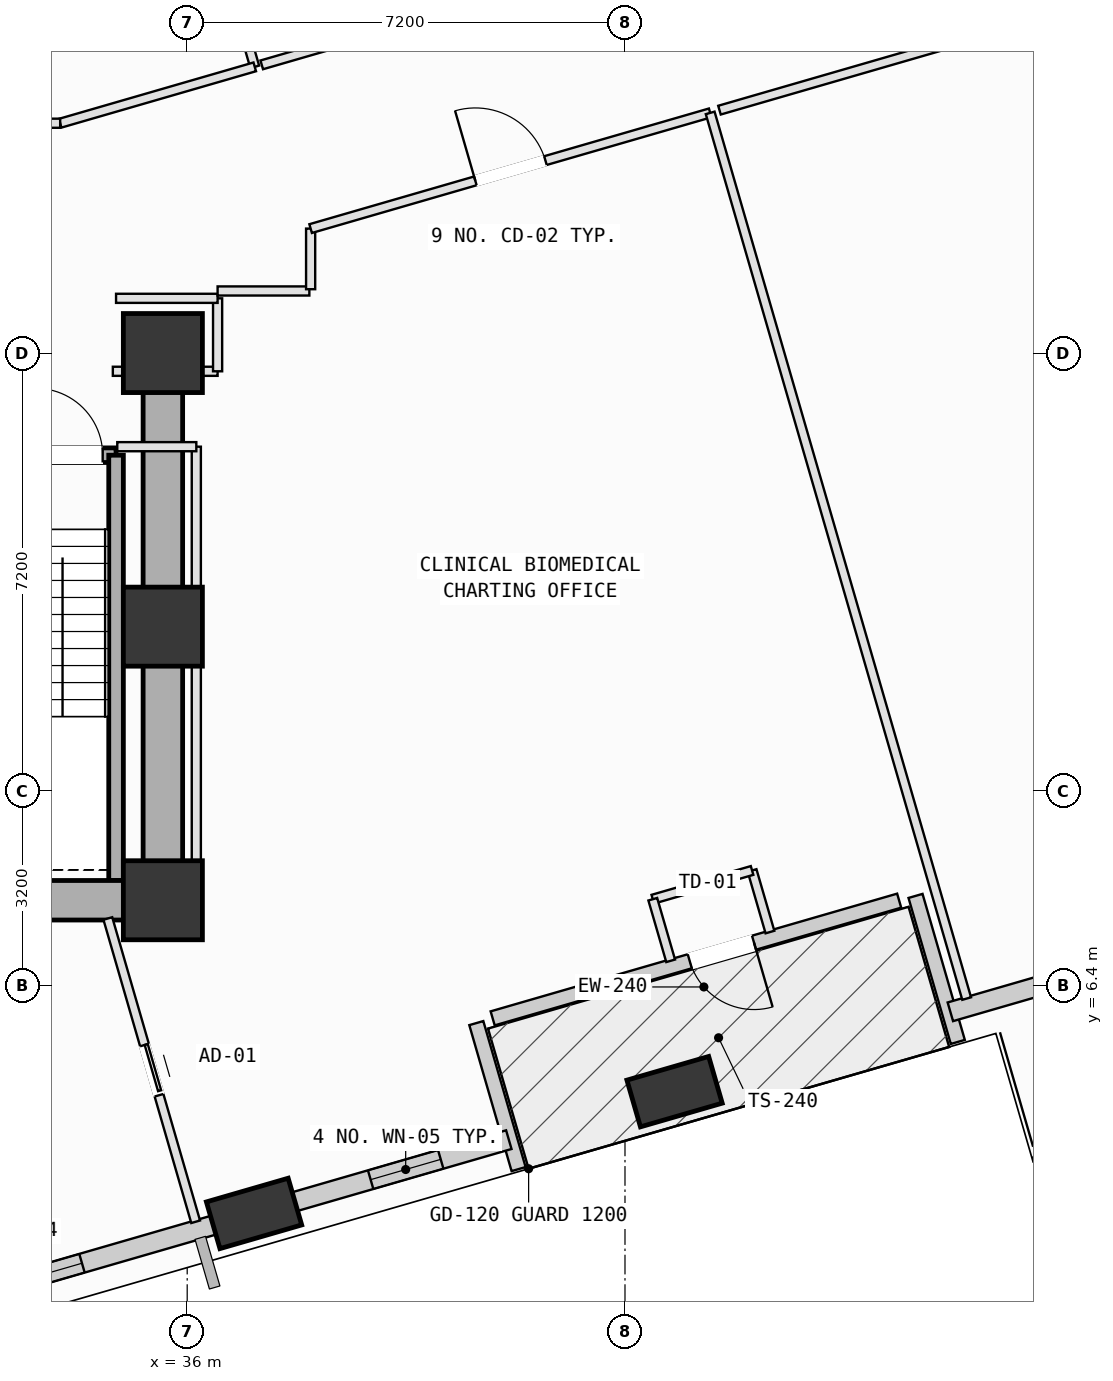
"""IFC4 building model, lengths in metres.
Left out: names, types, materials, properties, quantities, classifications, styles, units other than length and angle.
Written with IfcOpenShell. Run it as: python <this file> out.ifc"""

import sys

from ifc_helpers import new_model, si_unit, direction, frame, frame_2d, origin, origin_2d, place, context, subcontext, project, spatial, rectangle, extrude, element, fill, save


model = new_model("IFC4")
c1 = context("Model", 3, precision=1e-05, world=origin(), true_north=direction((0.0, 1.0)))
c2 = subcontext(c1, "Body", "Model", "MODEL_VIEW")
j1 = project(units=[si_unit("LENGTHUNIT", "METRE"), si_unit("PLANEANGLEUNIT", "RADIAN")], contexts=[c1])
p1 = place(None, origin())
s1 = spatial("IfcSite", under=j1, at=p1, CompositionType="ELEMENT")
p2 = place(p1, origin())
s2 = spatial("IfcBuilding", under=s1, at=p2, CompositionType="ELEMENT")
p3 = place(p2, frame((0.0, 0.0, 92.4)))
s3 = spatial("IfcBuildingStorey", under=s2, at=p3, CompositionType="ELEMENT", Elevation=92.4)
for number, where, z_axis, x_axis in (
    (1, (35.6, 7.8, 0.0), (0.0, 0.0, 1.0), (1.0, 0.0, 0.0)),
    (2, (35.6, 12.3, 0.0), (0.0, 0.0, 1.0), (1.0, 0.0, 0.0)),
    (3, (35.6, 16.8, 0.0), (0.0, 0.0, 1.0), (1.0, 0.0, 0.0)),
):
    element("IfcColumn", number, at=place(p3, frame(where, z_axis=z_axis, x_axis=x_axis)), inside=s3, PredefinedType="COLUMN", context=c2, shape_type="SweptSolid", body=[
        extrude(rectangle(XDim=1.3, YDim=1.3, at=origin_2d()), origin(), (0.0, 0.0, 1.0), 4.0),
    ])
p4 = place(p3, frame((37.1, 2.649, 0.002), z_axis=(0.091304057467, 0.015207204775, 0.995706939824), x_axis=(-0.4310043637, 0.901982463327, 0.025746345781)))
e4 = element("IfcColumn", 4, at=p4, inside=s3, PredefinedType="COLUMN", context=c2, shape_type="SweptSolid", body=[
    extrude(rectangle(XDim=1.4, YDim=0.8, at=origin_2d()), origin(), (0.0, 0.0, 1.0), 4.014),
])
p5 = place(p3, frame((44.015, 4.652, 0.002), z_axis=(0.082780006749, 0.043670863222, 0.995610529368), x_axis=(-0.693126808156, 0.720345403179, 0.026033208285)))
e5 = element("IfcColumn", 5, at=p5, inside=s3, PredefinedType="COLUMN", context=c2, shape_type="SweptSolid", body=[
    extrude(rectangle(XDim=1.4, YDim=0.8, at=origin_2d()), origin(), (0.0, 0.0, 1.0), 4.014),
])
p6 = place(p3, frame((47.709, 7.793, 0.0), z_axis=(0.0, 0.0, 1.0), x_axis=(-0.960532946144, -0.278166244127, 0.0)))
e6 = element("IfcWall", 6, at=p6, inside=s3, PredefinedType="SOLIDWALL", context=c2, shape_type="SweptSolid", body=[
    extrude(rectangle(XDim=6.96, YDim=0.24, at=frame_2d((3.48, 0.0))), origin(), (0.0, 0.0, 1.0), 3.165),
])
p7 = place(p6, frame((2.485, 0.0, 0.0)))
e7 = element("IfcOpeningElement", 7, at=p7, cuts=e6, PredefinedType="OPENING", context=c2, shape_type="SweptSolid", body=[
    extrude(rectangle(XDim=1.1, YDim=2.15, at=frame_2d((0.55, 1.075))), frame((0.0, 0.13, 0.0), z_axis=(0.0, -1.0, 0.0), x_axis=(1.0, 0.0, 0.0)), (0.0, 0.0, 1.0), 0.26),
])
for number, where, z_axis, x_axis in (
    (8, (40.755, 5.78, 0.0), (0.0, 0.0, 1.0), (0.278, -0.961, 0.0)),
    (9, (48.674, 5.47, 0.0), (0.0, 0.0, 1.0), (-0.278, 0.961, 0.0)),
):
    element("IfcWall", number, at=place(p3, frame(where, z_axis=z_axis, x_axis=x_axis)), inside=s3, PredefinedType="SOLIDWALL", context=c2, shape_type="SweptSolid", body=[
        extrude(rectangle(XDim=2.5, YDim=0.24, at=frame_2d((1.25, 0.0))), origin(), (0.0, 0.0, 1.0), 3.165),
    ])
p8 = place(p3, frame((36.801, 2.563, 0.0), z_axis=(0.0, 0.0, 1.0), x_axis=(-0.960536369331, -0.278154423284, 0.0)))
e10 = element("IfcWall", 10, at=p8, inside=s3, PredefinedType="SOLIDWALL", context=c2, shape_type="SweptSolid", body=[
    extrude(rectangle(XDim=6.214, YDim=0.32, at=frame_2d((3.107, 0.0))), origin(), (0.0, 0.0, 1.0), 3.165),
])
p9 = place(p8, frame((2.635, 0.0, 0.75)))
e11 = element("IfcOpeningElement", 11, at=p9, cuts=e10, PredefinedType="OPENING", context=c2, shape_type="SweptSolid", body=[
    extrude(rectangle(XDim=1.8, YDim=2.05, at=frame_2d((0.9, 1.025))), frame((0.0, 0.17, 0.0), z_axis=(0.0, -1.0, 0.0), x_axis=(1.0, 0.0, 0.0)), (0.0, 0.0, 1.0), 0.34),
])
p10 = place(p3, frame((41.289, 3.863, 0.0), z_axis=(0.0, 0.0, 1.0), x_axis=(-0.960529300019, -0.278178834213, 0.0)))
e12 = element("IfcWall", 12, at=p10, inside=s3, PredefinedType="SOLIDWALL", context=c2, shape_type="SweptSolid", body=[
    extrude(rectangle(XDim=3.682, YDim=0.32, at=frame_2d((1.841, 0.0))), origin(), (0.0, 0.0, 1.0), 3.145),
])
p11 = place(p10, frame((1.166, 0.0, 0.75)))
e13 = element("IfcOpeningElement", 13, at=p11, cuts=e12, PredefinedType="OPENING", context=c2, shape_type="SweptSolid", body=[
    extrude(rectangle(XDim=1.2, YDim=1.75, at=frame_2d((0.6, 0.875))), frame((0.0, 0.17, 0.0), z_axis=(0.0, -1.0, 0.0), x_axis=(1.0, 0.0, 0.0)), (0.0, 0.0, 1.0), 0.34),
])
p12 = place(p3, frame((50.64, 6.57, 0.0), z_axis=(0.0, 0.0, 1.0), x_axis=(-0.960543750342, -0.278128933553, 0.0)))
e14 = element("IfcWall", 14, at=p12, inside=s3, PredefinedType="SOLIDWALL", context=c2, shape_type="SweptSolid", body=[
    extrude(rectangle(XDim=2.175, YDim=0.32, at=frame_2d((1.088, 0.0))), origin(), (0.0, 0.0, 1.0), 3.145),
])
p13 = place(p3, frame((28.169, 21.822, 0.0), z_axis=(0.0, 0.0, 1.0), x_axis=(0.96054093962, 0.278138640455, 0.0)))
e15 = element("IfcWall", 15, at=p13, inside=s3, PredefinedType="SOLIDWALL", context=c2, shape_type="SweptSolid", body=[
    extrude(rectangle(XDim=5.96, YDim=0.32, at=frame_2d((2.98, 0.0))), origin(), (0.0, 0.0, 1.0), 3.165),
])
p14 = place(p3, frame((31.37, 15.12, 0.0), z_axis=(0.0, 0.0, 1.0), x_axis=(1.0, 0.0, 0.0)))
e16 = element("IfcWall", 16, at=p14, inside=s3, PredefinedType="SOLIDWALL", context=c2, shape_type="SweptSolid", body=[
    extrude(rectangle(XDim=3.46, YDim=0.24, at=frame_2d((1.73, 0.0))), origin(), (0.0, 0.0, 1.0), 3.78),
])
p15 = place(p14, frame((2.14, 0.0, 0.0)))
e17 = element("IfcOpeningElement", 17, at=p15, cuts=e16, PredefinedType="OPENING", context=c2, shape_type="SweptSolid", body=[
    extrude(rectangle(XDim=1.1, YDim=2.15, at=frame_2d((0.55, 1.075))), frame((0.0, 0.13, 0.0), z_axis=(0.0, -1.0, 0.0), x_axis=(1.0, 0.0, 0.0)), (0.0, 0.0, 1.0), 0.26),
])
p16 = place(p3, frame((34.83, 15.12, 0.0), z_axis=(0.0, 0.0, 1.0), x_axis=(0.0, -1.0, 0.0)))
e18 = element("IfcWall", 18, at=p16, inside=s3, PredefinedType="SOLIDWALL", context=c2, shape_type="SweptSolid", body=[
    extrude(rectangle(XDim=6.995, YDim=0.24, at=frame_2d((3.498, 0.0))), origin(), (0.0, 0.0, 1.0), 3.78),
])
p17 = place(p3, frame((24.8, 7.8, 0.0), z_axis=(0.0, 0.0, 1.0), x_axis=(1.0, 0.0, 0.0)))
e19 = element("IfcWall", 19, at=p17, inside=s3, PredefinedType="SHEAR", context=c2, shape_type="SweptSolid", body=[
    extrude(rectangle(XDim=10.8, YDim=0.65, at=frame_2d((5.4, 0.0))), origin(), (0.0, 0.0, 1.0), 3.78),
])
p18 = place(p3, frame((35.6, 7.8, 0.0), z_axis=(0.0, 0.0, 1.0), x_axis=(0.0, 1.0, 0.0)))
e20 = element("IfcWall", 20, at=p18, inside=s3, PredefinedType="SHEAR", context=c2, shape_type="SweptSolid", body=[
    extrude(rectangle(XDim=9.0, YDim=0.65, at=frame_2d((4.5, 0.0))), origin(), (0.0, 0.0, 1.0), 3.78),
])
p19 = place(p3, frame((34.695, 7.5, 0.0), z_axis=(0.0, 0.0, 1.0), x_axis=(0.27804780228, -0.960567238483, 0.0)))
e21 = element("IfcWall", 21, at=p19, inside=s3, PredefinedType="PARTITIONING", context=c2, shape_type="SweptSolid", body=[
    extrude(rectangle(XDim=5.193, YDim=0.15, at=frame_2d((2.596, 0.0))), origin(), (0.0, 0.0, 1.0), 3.78),
])
p20 = place(p19, frame((2.167, 0.0, 0.0)))
e22 = element("IfcOpeningElement", 22, at=p20, cuts=e21, PredefinedType="OPENING", context=c2, shape_type="SweptSolid", body=[
    extrude(rectangle(XDim=0.86, YDim=2.06, at=frame_2d((0.43, 1.03))), frame((0.0, 0.085, 0.0), z_axis=(0.0, -1.0, 0.0), x_axis=(1.0, 0.0, 0.0)), (0.0, 0.0, 1.0), 0.17),
])
p21 = place(p3, frame((37.817, 2.618, 0.0), z_axis=(0.0, 0.0, 1.0), x_axis=(-0.960475911695, -0.278363113674, 0.0)))
e23 = element("IfcWall", 23, at=p21, inside=s3, PredefinedType="PARTITIONING", context=c2, shape_type="SweptSolid", body=[
    extrude(rectangle(XDim=0.991, YDim=0.15, at=frame_2d((0.496, 0.0))), origin(), (0.0, 0.0, 1.0), 3.145),
])
p22 = place(p3, frame((35.6, 7.5, 0.0), z_axis=(0.0, 0.0, 1.0), x_axis=(1.0, 0.0, 0.0)))
e24 = element("IfcWall", 24, at=p22, inside=s3, PredefinedType="PARTITIONING", context=c2, shape_type="SweptSolid", body=[
    extrude(rectangle(XDim=0.55, YDim=0.15, at=frame_2d((0.275, 0.0))), origin(), (0.0, 0.0, 1.0), 2.945),
])
p23 = place(p3, frame((36.15, 7.5, 0.0), z_axis=(0.0, 0.0, 1.0), x_axis=(0.0, 1.0, 0.0)))
e25 = element("IfcWall", 25, at=p23, inside=s3, PredefinedType="PARTITIONING", context=c2, shape_type="SweptSolid", body=[
    extrude(rectangle(XDim=7.76, YDim=0.15, at=frame_2d((3.88, 0.0))), origin(), (0.0, 0.0, 1.0), 3.78),
])
p24 = place(p3, frame((36.15, 15.26, 0.0), z_axis=(0.0, 0.0, 1.0), x_axis=(-1.0, 0.0, 0.0)))
e26 = element("IfcWall", 26, at=p24, inside=s3, PredefinedType="PARTITIONING", context=c2, shape_type="SweptSolid", body=[
    extrude(rectangle(XDim=1.3, YDim=0.15, at=frame_2d((0.65, 0.0))), origin(), (0.0, 0.0, 1.0), 3.78),
])
p25 = place(p3, frame((34.777, 16.5, 0.0), z_axis=(0.0, 0.0, 1.0), x_axis=(1.0, 0.0, 0.0)))
e27 = element("IfcWall", 27, at=p25, inside=s3, PredefinedType="PARTITIONING", context=c2, shape_type="SweptSolid", body=[
    extrude(rectangle(XDim=1.723, YDim=0.15, at=frame_2d((0.861, 0.0))), origin(), (0.0, 0.0, 1.0), 2.965),
])
p26 = place(p3, frame((36.5, 16.5, 0.0), z_axis=(0.0, 0.0, 1.0), x_axis=(0.0, 1.0, 0.0)))
e28 = element("IfcWall", 28, at=p26, inside=s3, PredefinedType="PARTITIONING", context=c2, shape_type="SweptSolid", body=[
    extrude(rectangle(XDim=1.2, YDim=0.15, at=frame_2d((0.6, 0.0))), origin(), (0.0, 0.0, 1.0), 3.78),
])
p27 = place(p3, frame((36.5, 17.7, 0.0), z_axis=(0.0, 0.0, 1.0), x_axis=(-1.0, 0.0, 0.0)))
e29 = element("IfcWall", 29, at=p27, inside=s3, PredefinedType="PARTITIONING", context=c2, shape_type="SweptSolid", body=[
    extrude(rectangle(XDim=1.67, YDim=0.15, at=frame_2d((0.835, 0.0))), origin(), (0.0, 0.0, 1.0), 3.78),
])
p28 = place(p3, frame((36.5, 17.821, 0.0), z_axis=(0.0, 0.0, 1.0), x_axis=(1.0, 0.0, 0.0)))
e30 = element("IfcWall", 30, at=p28, inside=s3, PredefinedType="PARTITIONING", context=c2, shape_type="SweptSolid", body=[
    extrude(rectangle(XDim=1.509, YDim=0.15, at=frame_2d((0.754, 0.0))), origin(), (0.0, 0.0, 1.0), 3.78),
])
p29 = place(p3, frame((38.03, 17.85, 0.0), z_axis=(0.0, 0.0, 1.0), x_axis=(0.0, 1.0, 0.0)))
e31 = element("IfcWall", 31, at=p29, inside=s3, PredefinedType="PARTITIONING", context=c2, shape_type="SweptSolid", body=[
    extrude(rectangle(XDim=0.997, YDim=0.15, at=frame_2d((0.499, 0.0))), origin(), (0.0, 0.0, 1.0), 3.78),
])
p30 = place(p3, frame((38.03, 18.847, 0.0), z_axis=(0.0, 0.0, 1.0), x_axis=(0.960527884636, 0.278183721372, 0.0)))
e32 = element("IfcWall", 32, at=p30, inside=s3, PredefinedType="PARTITIONING", context=c2, shape_type="SweptSolid", body=[
    extrude(rectangle(XDim=6.841, YDim=0.15, at=frame_2d((3.42, 0.0))), origin(), (0.0, 0.0, 1.0), 2.965),
])
p31 = place(p30, frame((2.821, 0.0, 0.0)))
e33 = element("IfcOpeningElement", 33, at=p31, cuts=e32, PredefinedType="OPENING", context=c2, shape_type="SweptSolid", body=[
    extrude(rectangle(XDim=1.2, YDim=2.15, at=frame_2d((0.6, 1.075))), frame((0.0, 0.085, 0.0), z_axis=(0.0, -1.0, 0.0), x_axis=(1.0, 0.0, 0.0)), (0.0, 0.0, 1.0), 0.17),
])
p32 = place(p3, frame((44.601, 20.75, 0.0), z_axis=(0.0, 0.0, 1.0), x_axis=(0.278136254334, -0.960541630553, 0.0)))
e34 = element("IfcWall", 34, at=p32, inside=s3, PredefinedType="PARTITIONING", context=c2, shape_type="SweptSolid", body=[
    extrude(rectangle(XDim=15.165, YDim=0.15, at=frame_2d((7.583, 0.0))), origin(), (0.0, 0.0, 1.0), 3.78),
])
p33 = place(p3, frame((45.584, 7.277, 0.0), z_axis=(0.0, 0.0, 1.0), x_axis=(-0.278693123589, 0.960380207451, 0.0)))
e35 = element("IfcWall", 35, at=p33, inside=s3, PredefinedType="PARTITIONING", context=c2, shape_type="SweptSolid", body=[
    extrude(rectangle(XDim=1.055, YDim=0.15, at=frame_2d((0.527, 0.0))), origin(), (0.0, 0.0, 1.0), 3.78),
])
p34 = place(p3, frame((45.29, 8.29, 0.0), z_axis=(0.0, 0.0, 1.0), x_axis=(-0.960498634142, -0.278284699203, 0.0)))
e36 = element("IfcWall", 36, at=p34, inside=s3, PredefinedType="PARTITIONING", context=c2, shape_type="SweptSolid", body=[
    extrude(rectangle(XDim=1.7, YDim=0.15, at=frame_2d((0.85, 0.0))), origin(), (0.0, 0.0, 1.0), 3.78),
])
p35 = place(p3, frame((43.657, 7.817, 0.0), z_axis=(0.0, 0.0, 1.0), x_axis=(0.278693123589, -0.960380207451, 0.0)))
e37 = element("IfcWall", 37, at=p35, inside=s3, PredefinedType="PARTITIONING", context=c2, shape_type="SweptSolid", body=[
    extrude(rectangle(XDim=1.055, YDim=0.15, at=frame_2d((0.527, 0.0))), origin(), (0.0, 0.0, 1.0), 3.78),
])
p36 = place(p3, frame((44.754, 20.795, 0.0), z_axis=(0.0, 0.0, 1.0), x_axis=(0.960551683632, 0.278101533745, 0.0)))
e38 = element("IfcWall", 38, at=p36, inside=s3, PredefinedType="PARTITIONING", context=c2, shape_type="SweptSolid", body=[
    extrude(rectangle(XDim=10.64, YDim=0.15, at=frame_2d((5.32, 0.0))), origin(), (0.0, 0.0, 1.0), 3.78),
])
p37 = place(p36, frame((4.72, 0.0, 0.0)))
e39 = element("IfcOpeningElement", 39, at=p37, cuts=e38, PredefinedType="OPENING", context=c2, shape_type="SweptSolid", body=[
    extrude(rectangle(XDim=1.2, YDim=2.15, at=frame_2d((0.6, 1.075))), frame((0.0, 0.085, 0.0), z_axis=(0.0, -1.0, 0.0), x_axis=(1.0, 0.0, 0.0)), (0.0, 0.0, 1.0), 0.17),
])
p38 = place(p3, frame((36.373, 24.057, 0.0), z_axis=(0.0, 0.0, 1.0), x_axis=(0.278035744254, -0.960570728743, 0.0)))
e40 = element("IfcWall", 40, at=p38, inside=s3, PredefinedType="PARTITIONING", context=c2, shape_type="SweptSolid", body=[
    extrude(rectangle(XDim=2.655, YDim=0.15, at=frame_2d((1.327, 0.0))), origin(), (0.0, 0.0, 1.0), 3.78),
])
p39 = place(p3, frame((37.111, 21.507, 0.0), z_axis=(0.0, 0.0, 1.0), x_axis=(-0.96051377414, -0.278232438237, 0.0)))
e41 = element("IfcWall", 41, at=p39, inside=s3, PredefinedType="PARTITIONING", context=c2, shape_type="SweptSolid", body=[
    extrude(rectangle(XDim=3.332, YDim=0.15, at=frame_2d((1.666, 0.0))), origin(), (0.0, 0.0, 1.0), 3.78),
])
p40 = place(p3, frame((33.911, 20.58, 0.0), z_axis=(0.0, 0.0, 1.0), x_axis=(-1.0, 0.0, 0.0)))
e42 = element("IfcWall", 42, at=p40, inside=s3, PredefinedType="PARTITIONING", context=c2, shape_type="SweptSolid", body=[
    extrude(rectangle(XDim=13.081, YDim=0.15, at=frame_2d((6.541, 0.0))), origin(), (0.0, 0.0, 1.0), 3.78),
])
p41 = place(p40, frame((7.299, 0.0, 0.0)))
e43 = element("IfcOpeningElement", 43, at=p41, cuts=e42, PredefinedType="OPENING", context=c2, shape_type="SweptSolid", body=[
    extrude(rectangle(XDim=1.2, YDim=2.15, at=frame_2d((0.6, 1.075))), frame((0.0, 0.085, 0.0), z_axis=(0.0, -1.0, 0.0), x_axis=(1.0, 0.0, 0.0)), (0.0, 0.0, 1.0), 0.17),
])
p42 = place(p3, frame((48.998, 24.949, 0.0), z_axis=(0.0, 0.0, 1.0), x_axis=(-0.960536816253, -0.278152879948, 0.0)))
e44 = element("IfcWall", 44, at=p42, inside=s3, PredefinedType="PARTITIONING", context=c2, shape_type="SweptSolid", body=[
    extrude(rectangle(XDim=12.256, YDim=0.15, at=frame_2d((6.128, 0.0))), origin(), (0.0, 0.0, 1.0), 2.965),
])
p43 = place(p42, frame((5.528, 0.0, 0.0)))
e45 = element("IfcOpeningElement", 45, at=p43, cuts=e44, PredefinedType="OPENING", context=c2, shape_type="SweptSolid", body=[
    extrude(rectangle(XDim=1.2, YDim=2.15, at=frame_2d((0.6, 1.075))), frame((0.0, 0.085, 0.0), z_axis=(0.0, -1.0, 0.0), x_axis=(1.0, 0.0, 0.0)), (0.0, 0.0, 1.0), 0.17),
])
p44 = place(p7, origin())
e46 = element("IfcDoor", 46, at=p44, inside=s3, OperationType="SINGLE_SWING_LEFT", PredefinedType="DOOR", context=c2, shape_type="SweptSolid", body=[
    extrude(rectangle(XDim=1.1, YDim=2.15, at=frame_2d((0.55, 1.075))), frame((0.0, 0.025, 0.0), z_axis=(0.0, -1.0, 0.0), x_axis=(1.0, 0.0, 0.0)), (0.0, 0.0, 1.0), 0.05),
])
fill(e7, e46)
p45 = place(p9, origin())
e47 = element("IfcWindow", 47, at=p45, inside=s3, PartitioningType="SINGLE_PANEL", PredefinedType="WINDOW", context=c2, shape_type="SweptSolid", body=[
    extrude(rectangle(XDim=1.8, YDim=2.05, at=frame_2d((0.9, 1.025))), frame((0.0, 0.03, 0.0), z_axis=(0.0, -1.0, 0.0), x_axis=(1.0, 0.0, 0.0)), (0.0, 0.0, 1.0), 0.06),
])
fill(e11, e47)
p46 = place(p11, origin())
e48 = element("IfcWindow", 48, at=p46, inside=s3, PartitioningType="SINGLE_PANEL", PredefinedType="WINDOW", context=c2, shape_type="SweptSolid", body=[
    extrude(rectangle(XDim=1.2, YDim=1.75, at=frame_2d((0.6, 0.875))), frame((0.0, 0.03, 0.0), z_axis=(0.0, -1.0, 0.0), x_axis=(1.0, 0.0, 0.0)), (0.0, 0.0, 1.0), 0.06),
])
fill(e13, e48)
p47 = place(p15, origin())
e49 = element("IfcDoor", 49, at=p47, inside=s3, OperationType="SINGLE_SWING_LEFT", PredefinedType="DOOR", context=c2, shape_type="SweptSolid", body=[
    extrude(rectangle(XDim=1.1, YDim=2.15, at=frame_2d((0.55, 1.075))), frame((0.0, 0.025, 0.0), z_axis=(0.0, -1.0, 0.0), x_axis=(1.0, 0.0, 0.0)), (0.0, 0.0, 1.0), 0.05),
])
fill(e17, e49)
p48 = place(p31, origin())
e50 = element("IfcDoor", 50, at=p48, inside=s3, OperationType="SINGLE_SWING_LEFT", PredefinedType="DOOR", context=c2, shape_type="SweptSolid", body=[
    extrude(rectangle(XDim=1.2, YDim=2.15, at=frame_2d((0.6, 1.075))), frame((0.0, 0.025, 0.0), z_axis=(0.0, -1.0, 0.0), x_axis=(1.0, 0.0, 0.0)), (0.0, 0.0, 1.0), 0.05),
])
fill(e33, e50)
p49 = place(p20, origin())
e51 = element("IfcDoor", 51, at=p49, inside=s3, OperationType="SLIDING_TO_LEFT", PredefinedType="DOOR", context=c2, shape_type="SweptSolid", body=[
    extrude(rectangle(XDim=0.86, YDim=2.06, at=frame_2d((0.43, 1.03))), frame((0.0, 0.025, 0.0), z_axis=(0.0, -1.0, 0.0), x_axis=(1.0, 0.0, 0.0)), (0.0, 0.0, 1.0), 0.05),
])
fill(e22, e51)
save(model, sys.argv[1])
